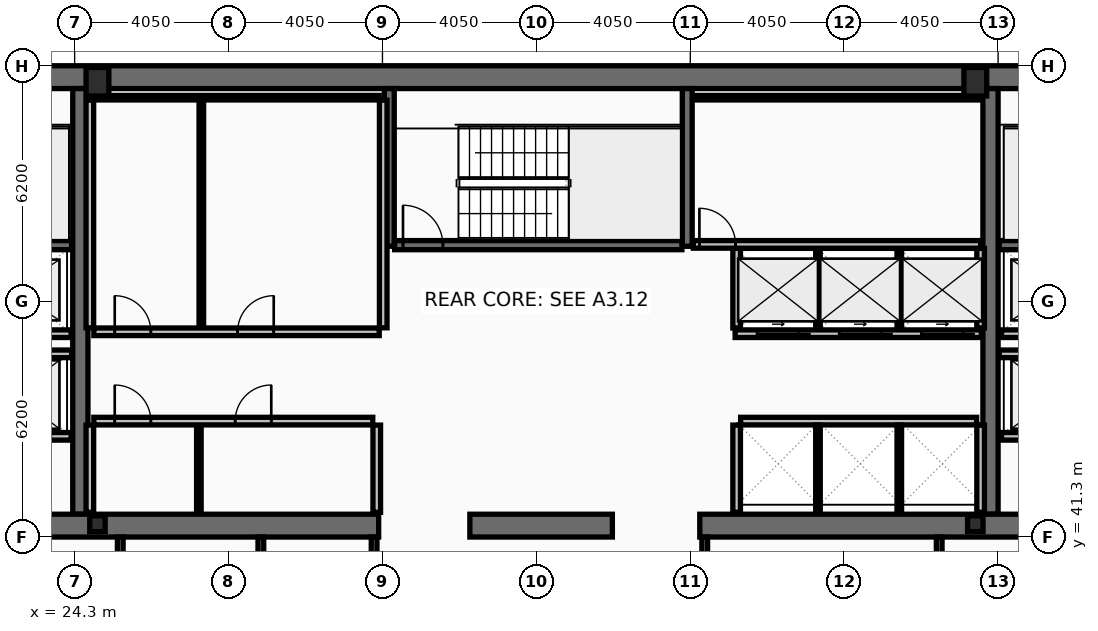
"""IFC4 building model, lengths in metres.
Left out: names, types, materials, properties, quantities, classifications, styles, units other than length and angle.
Written with IfcOpenShell. Run it as: python <this file> out.ifc"""

import sys

from ifc_helpers import new_model, si_unit, direction, frame, frame_2d, origin, origin_2d, place, context, subcontext, project, spatial, rectangle, hollow_rectangle, i_section, extrude, element, fill, save


model = new_model("IFC4")
c1 = context("Model", 3, precision=1e-05, world=origin(), true_north=direction((0.0, 1.0)))
c2 = subcontext(c1, "Body", "Model", "MODEL_VIEW")
j1 = project(units=[si_unit("LENGTHUNIT", "METRE"), si_unit("PLANEANGLEUNIT", "RADIAN")], contexts=[c1])
p1 = place(None, origin())
s1 = spatial("IfcSite", under=j1, at=p1, CompositionType="ELEMENT")
p2 = place(p1, origin())
s2 = spatial("IfcBuilding", under=s1, at=p2, CompositionType="ELEMENT")
p3 = place(p2, frame((0.0, 0.0, 217.4)))
s3 = spatial("IfcBuildingStorey", under=s2, at=p3, CompositionType="ELEMENT", Elevation=217.4)
p4 = place(p3, frame((16.2, 53.4, 0.0), z_axis=(0.0, 0.0, 1.0), x_axis=(1.0, 0.0, 0.0)))
e1 = element("IfcWall", 1, at=p4, inside=s3, PredefinedType="SHEAR", context=c2, shape_type="SweptSolid", body=[
    extrude(rectangle(XDim=40.5, YDim=0.6, at=frame_2d((20.25, 0.0))), origin(), (0.0, 0.0, 1.0), 3.44),
])
for number, where, z_axis, x_axis in (
    (2, (24.45, 41.9, 0.0), (0.0, 0.0, 1.0), (0.0, 1.0, 0.0)),
    (3, (48.4, 41.9, 0.0), (0.0, 0.0, 1.0), (0.0, 1.0, 0.0)),
):
    element("IfcWall", number, at=place(p3, frame(where, z_axis=z_axis, x_axis=x_axis)), inside=s3, PredefinedType="SHEAR", context=c2, shape_type="SweptSolid", body=[
        extrude(rectangle(XDim=11.2, YDim=0.4, at=frame_2d((5.6, 0.0))), origin(), (0.0, 0.0, 1.0), 3.44),
    ])
p5 = place(p3, frame((32.3, 41.6, 0.0), z_axis=(0.0, 0.0, 1.0), x_axis=(-1.0, 0.0, 0.0)))
e4 = element("IfcWall", 4, at=p5, inside=s3, PredefinedType="SHEAR", context=c2, shape_type="SweptSolid", body=[
    extrude(rectangle(XDim=11.45, YDim=0.6, at=frame_2d((5.725, 0.0))), origin(), (0.0, 0.0, 1.0), 3.44),
])
p6 = place(p3, frame((38.45, 41.6, 0.0), z_axis=(0.0, 0.0, 1.0), x_axis=(-1.0, 0.0, 0.0)))
e5 = element("IfcWall", 5, at=p6, inside=s3, PredefinedType="SHEAR", context=c2, shape_type="SweptSolid", body=[
    extrude(rectangle(XDim=3.75, YDim=0.6, at=frame_2d((1.875, 0.0))), origin(), (0.0, 0.0, 1.0), 3.44),
])
p7 = place(p3, frame((52.05, 41.6, 0.0), z_axis=(0.0, 0.0, 1.0), x_axis=(-1.0, 0.0, 0.0)))
e6 = element("IfcWall", 6, at=p7, inside=s3, PredefinedType="SHEAR", context=c2, shape_type="SweptSolid", body=[
    extrude(rectangle(XDim=11.3, YDim=0.6, at=frame_2d((5.65, 0.0))), origin(), (0.0, 0.0, 1.0), 3.44),
])
for number, where, z_axis, x_axis in (
    (7, (32.58, 48.95, 0.0), (0.0, 0.0, 1.0), (0.0, 1.0, 0.0)),
    (8, (40.42, 48.95, 0.0), (0.0, 0.0, 1.0), (0.0, 1.0, 0.0)),
):
    element("IfcWall", number, at=place(p3, frame(where, z_axis=z_axis, x_axis=x_axis)), inside=s3, PredefinedType="SHEAR", context=c2, shape_type="SweptSolid", body=[
        extrude(rectangle(XDim=4.15, YDim=0.26, at=frame_2d((2.075, 0.0))), origin(), (0.0, 0.0, 1.0), 3.44),
    ])
p8 = place(p3, frame((16.8, 48.98, 0.0), z_axis=(0.0, 0.0, 1.0), x_axis=(1.0, 0.0, 0.0)))
e9 = element("IfcWall", 9, at=p8, inside=s3, PredefinedType="SHEAR", context=c2, shape_type="SweptSolid", body=[
    extrude(rectangle(XDim=7.42, YDim=0.24, at=frame_2d((3.71, 0.0))), origin(), (0.0, 0.0, 1.0), 3.44),
])
p9 = place(p8, frame((0.22, 0.0, 0.0)))
e10 = element("IfcOpeningElement", 10, at=p9, cuts=e9, PredefinedType="OPENING", context=c2, shape_type="SweptSolid", body=[
    extrude(rectangle(XDim=1.05, YDim=2.15, at=frame_2d((0.525, 1.075))), frame((0.0, 0.13, 0.0), z_axis=(0.0, -1.0, 0.0), x_axis=(1.0, 0.0, 0.0)), (0.0, 0.0, 1.0), 0.26),
])
p10 = place(p3, frame((48.63, 48.98, 0.0), z_axis=(0.0, 0.0, 1.0), x_axis=(1.0, 0.0, 0.0)))
e11 = element("IfcWall", 11, at=p10, inside=s3, PredefinedType="SHEAR", context=c2, shape_type="SweptSolid", body=[
    extrude(rectangle(XDim=7.47, YDim=0.24, at=frame_2d((3.735, 0.0))), origin(), (0.0, 0.0, 1.0), 3.44),
])
p11 = place(p10, frame((6.2, 0.0, 0.0)))
e12 = element("IfcOpeningElement", 12, at=p11, cuts=e11, PredefinedType="OPENING", context=c2, shape_type="SweptSolid", body=[
    extrude(rectangle(XDim=1.05, YDim=2.15, at=frame_2d((0.525, 1.075))), frame((0.0, 0.13, 0.0), z_axis=(0.0, -1.0, 0.0), x_axis=(1.0, 0.0, 0.0)), (0.0, 0.0, 1.0), 0.26),
])
p12 = place(p3, frame((32.72, 48.98, 0.0), z_axis=(0.0, 0.0, 1.0), x_axis=(1.0, 0.0, 0.0)))
e13 = element("IfcWall", 13, at=p12, inside=s3, PredefinedType="SHEAR", context=c2, shape_type="SweptSolid", body=[
    extrude(rectangle(XDim=7.56, YDim=0.24, at=frame_2d((3.78, 0.0))), origin(), (0.0, 0.0, 1.0), 3.44),
])
p13 = place(p12, frame((0.22, 0.0, 0.0)))
e14 = element("IfcOpeningElement", 14, at=p13, cuts=e13, PredefinedType="OPENING", context=c2, shape_type="SweptSolid", body=[
    extrude(rectangle(XDim=1.05, YDim=2.15, at=frame_2d((0.525, 1.075))), frame((0.0, 0.13, 0.0), z_axis=(0.0, -1.0, 0.0), x_axis=(1.0, 0.0, 0.0)), (0.0, 0.0, 1.0), 0.26),
])
for number, where, z_axis, x_axis in (
    (15, (24.9, 53.28, 0.0), (0.0, 0.0, 1.0), (1.0, 0.0, 0.0)),
    (16, (48.0, 53.28, 0.0), (0.0, 0.0, 1.0), (1.0, 0.0, 0.0)),
):
    element("IfcColumn", number, at=place(p3, frame(where, z_axis=z_axis, x_axis=x_axis)), inside=s3, PredefinedType="COLUMN", context=c2, shape_type="SweptSolid", body=[
        extrude(hollow_rectangle(XDim=0.6, YDim=0.75, WallThickness=0.045, at=origin_2d()), origin(), (0.0, 0.0, 1.0), 3.6),
    ])
for number, where, z_axis, x_axis in (
    (17, (24.9, 41.65, 0.0), (0.0, 0.0, 1.0), (1.0, 0.0, 0.0)),
    (18, (48.0, 41.65, 0.0), (0.0, 0.0, 1.0), (1.0, 0.0, 0.0)),
):
    element("IfcColumn", number, at=place(p3, frame(where, z_axis=z_axis, x_axis=x_axis)), inside=s3, PredefinedType="COLUMN", context=c2, shape_type="SweptSolid", body=[
        extrude(i_section(OverallWidth=0.406, OverallDepth=0.416, WebThickness=0.03, FlangeThickness=0.048, at=origin_2d()), origin(), (0.0, 0.0, 1.0), 3.6),
    ])
p14 = place(p3, frame((51.61, 43.95, 0.0), z_axis=(0.0, 0.0, 1.0), x_axis=(-1.0, 0.0, 0.0)))
e19 = element("IfcWall", 19, at=p14, inside=s3, PredefinedType="PARTITIONING", context=c2, shape_type="SweptSolid", body=[
    extrude(rectangle(XDim=2.92, YDim=0.2, at=frame_2d((1.46, 0.0))), origin(), (0.0, 0.0, 1.0), 3.44),
])
p15 = place(p14, frame((0.81, 0.0, 0.0)))
e20 = element("IfcOpeningElement", 20, at=p15, cuts=e19, PredefinedType="OPENING", context=c2, shape_type="SweptSolid", body=[
    extrude(rectangle(XDim=1.3, YDim=2.18, at=frame_2d((0.65, 1.09))), frame((0.0, 0.11, 0.0), z_axis=(0.0, -1.0, 0.0), x_axis=(1.0, 0.0, 0.0)), (0.0, 0.0, 1.0), 0.22),
])
p16 = place(p3, frame((24.21, 43.95, 0.0), z_axis=(0.0, 0.0, 1.0), x_axis=(-1.0, 0.0, 0.0)))
e21 = element("IfcWall", 21, at=p16, inside=s3, PredefinedType="PARTITIONING", context=c2, shape_type="SweptSolid", body=[
    extrude(rectangle(XDim=2.97, YDim=0.2, at=frame_2d((1.485, 0.0))), origin(), (0.0, 0.0, 1.0), 3.44),
])
p17 = place(p16, frame((0.86, 0.0, 0.0)))
e22 = element("IfcOpeningElement", 22, at=p17, cuts=e21, PredefinedType="OPENING", context=c2, shape_type="SweptSolid", body=[
    extrude(rectangle(XDim=1.3, YDim=2.18, at=frame_2d((0.65, 1.09))), frame((0.0, 0.11, 0.0), z_axis=(0.0, -1.0, 0.0), x_axis=(1.0, 0.0, 0.0)), (0.0, 0.0, 1.0), 0.22),
])
p18 = place(p3, frame((51.61, 46.65, 0.0), z_axis=(0.0, 0.0, 1.0), x_axis=(-1.0, 0.0, 0.0)))
e23 = element("IfcWall", 23, at=p18, inside=s3, PredefinedType="PARTITIONING", context=c2, shape_type="SweptSolid", body=[
    extrude(rectangle(XDim=2.92, YDim=0.2, at=frame_2d((1.46, 0.0))), origin(), (0.0, 0.0, 1.0), 3.44),
])
p19 = place(p18, frame((0.86, 0.0, 0.0)))
e24 = element("IfcOpeningElement", 24, at=p19, cuts=e23, PredefinedType="OPENING", context=c2, shape_type="SweptSolid", body=[
    extrude(rectangle(XDim=1.2, YDim=2.18, at=frame_2d((0.6, 1.09))), frame((0.0, 0.11, 0.0), z_axis=(0.0, -1.0, 0.0), x_axis=(1.0, 0.0, 0.0)), (0.0, 0.0, 1.0), 0.22),
])
p20 = place(p3, frame((24.21, 46.65, 0.0), z_axis=(0.0, 0.0, 1.0), x_axis=(-1.0, 0.0, 0.0)))
e25 = element("IfcWall", 25, at=p20, inside=s3, PredefinedType="PARTITIONING", context=c2, shape_type="SweptSolid", body=[
    extrude(rectangle(XDim=2.97, YDim=0.2, at=frame_2d((1.485, 0.0))), origin(), (0.0, 0.0, 1.0), 3.44),
])
p21 = place(p20, frame((0.91, 0.0, 0.0)))
e26 = element("IfcOpeningElement", 26, at=p21, cuts=e25, PredefinedType="OPENING", context=c2, shape_type="SweptSolid", body=[
    extrude(rectangle(XDim=1.2, YDim=2.18, at=frame_2d((0.6, 1.09))), frame((0.0, 0.11, 0.0), z_axis=(0.0, -1.0, 0.0), x_axis=(1.0, 0.0, 0.0)), (0.0, 0.0, 1.0), 0.22),
])
p22 = place(p3, frame((48.16, 46.65, 0.0), z_axis=(0.0, 0.0, 1.0), x_axis=(-1.0, 0.0, 0.0)))
e27 = element("IfcWall", 27, at=p22, inside=s3, PredefinedType="PARTITIONING", context=c2, shape_type="SweptSolid", body=[
    extrude(rectangle(XDim=6.48, YDim=0.2, at=frame_2d((3.24, 0.0))), origin(), (0.0, 0.0, 1.0), 3.44),
])
p23 = place(p22, frame((4.8, 0.0, 0.0)))
e28 = element("IfcOpeningElement", 28, at=p23, cuts=e27, PredefinedType="OPENING", context=c2, shape_type="SweptSolid", body=[
    extrude(rectangle(XDim=1.1, YDim=2.18, at=frame_2d((0.55, 1.09))), frame((0.0, 0.11, 0.0), z_axis=(0.0, -1.0, 0.0), x_axis=(1.0, 0.0, 0.0)), (0.0, 0.0, 1.0), 0.22),
])
p24 = place(p22, frame((2.64, 0.0, 0.0)))
e29 = element("IfcOpeningElement", 29, at=p24, cuts=e27, PredefinedType="OPENING", context=c2, shape_type="SweptSolid", body=[
    extrude(rectangle(XDim=1.1, YDim=2.18, at=frame_2d((0.55, 1.09))), frame((0.0, 0.11, 0.0), z_axis=(0.0, -1.0, 0.0), x_axis=(1.0, 0.0, 0.0)), (0.0, 0.0, 1.0), 0.22),
])
p25 = place(p22, frame((0.48, 0.0, 0.0)))
e30 = element("IfcOpeningElement", 30, at=p25, cuts=e27, PredefinedType="OPENING", context=c2, shape_type="SweptSolid", body=[
    extrude(rectangle(XDim=1.1, YDim=2.18, at=frame_2d((0.55, 1.09))), frame((0.0, 0.11, 0.0), z_axis=(0.0, -1.0, 0.0), x_axis=(1.0, 0.0, 0.0)), (0.0, 0.0, 1.0), 0.22),
])
p26 = place(p3, frame((21.2, 46.12, 0.0), z_axis=(0.0, 0.0, 1.0), x_axis=(1.0, 0.0, 0.0)))
e31 = element("IfcWall", 31, at=p26, inside=s3, PredefinedType="PARTITIONING", context=c2, shape_type="SweptSolid", body=[
    extrude(rectangle(XDim=3.02, YDim=0.2, at=frame_2d((1.51, 0.0))), origin(), (0.0, 0.0, 1.0), 3.44),
])
p27 = place(p3, frame((48.63, 46.12, 0.0), z_axis=(0.0, 0.0, 1.0), x_axis=(1.0, 0.0, 0.0)))
e32 = element("IfcWall", 32, at=p27, inside=s3, PredefinedType="PARTITIONING", context=c2, shape_type="SweptSolid", body=[
    extrude(rectangle(XDim=3.07, YDim=0.2, at=frame_2d((1.535, 0.0))), origin(), (0.0, 0.0, 1.0), 3.44),
])
for number, where, z_axis, x_axis in (
    (33, (24.7, 46.805, 0.0), (0.0, 0.0, 1.0), (0.0, 1.0, 0.0)),
    (34, (32.42, 46.805, 0.0), (0.0, 0.0, 1.0), (0.0, 1.0, 0.0)),
):
    element("IfcWall", number, at=place(p3, frame(where, z_axis=z_axis, x_axis=x_axis)), inside=s3, PredefinedType="PARTITIONING", context=c2, shape_type="SweptSolid", body=[
        extrude(rectangle(XDim=5.99, YDim=0.2, at=frame_2d((2.995, 0.0))), origin(), (0.0, 0.0, 1.0), 3.44),
    ])
p28 = place(p3, frame((24.805, 52.86, 0.0), z_axis=(0.0, 0.0, 1.0), x_axis=(1.0, 0.0, 0.0)))
e35 = element("IfcWall", 35, at=p28, inside=s3, PredefinedType="PARTITIONING", context=c2, shape_type="SweptSolid", body=[
    extrude(rectangle(XDim=7.51, YDim=0.12, at=frame_2d((3.755, 0.0))), origin(), (0.0, 0.0, 1.0), 3.44),
])
p29 = place(p3, frame((27.634, 46.805, 0.0), z_axis=(0.0, 0.0, 1.0), x_axis=(0.0, 1.0, 0.0)))
e36 = element("IfcWall", 36, at=p29, inside=s3, PredefinedType="PARTITIONING", context=c2, shape_type="SweptSolid", body=[
    extrude(rectangle(XDim=5.99, YDim=0.12, at=frame_2d((2.995, 0.0))), origin(), (0.0, 0.0, 1.0), 3.44),
])
p30 = place(p3, frame((24.805, 46.7, 0.0), z_axis=(0.0, 0.0, 1.0), x_axis=(1.0, 0.0, 0.0)))
e37 = element("IfcWall", 37, at=p30, inside=s3, PredefinedType="PARTITIONING", context=c2, shape_type="SweptSolid", body=[
    extrude(rectangle(XDim=7.51, YDim=0.2, at=frame_2d((3.755, 0.0))), origin(), (0.0, 0.0, 1.0), 3.44),
])
p31 = place(p30, frame((0.55, 0.0, 0.0)))
e38 = element("IfcOpeningElement", 38, at=p31, cuts=e37, PredefinedType="OPENING", context=c2, shape_type="SweptSolid", body=[
    extrude(rectangle(XDim=0.95, YDim=2.1, at=frame_2d((0.475, 1.05))), frame((0.0, 0.11, 0.0), z_axis=(0.0, -1.0, 0.0), x_axis=(1.0, 0.0, 0.0)), (0.0, 0.0, 1.0), 0.22),
])
p32 = place(p30, frame((3.784, 0.0, 0.0)))
e39 = element("IfcOpeningElement", 39, at=p32, cuts=e37, PredefinedType="OPENING", context=c2, shape_type="SweptSolid", body=[
    extrude(rectangle(XDim=0.95, YDim=2.1, at=frame_2d((0.475, 1.05))), frame((0.0, 0.11, 0.0), z_axis=(0.0, -1.0, 0.0), x_axis=(1.0, 0.0, 0.0)), (0.0, 0.0, 1.0), 0.22),
])
for number, where, z_axis, x_axis in (
    (40, (24.7, 41.95, 0.0), (0.0, 0.0, 1.0), (0.0, 1.0, 0.0)),
    (41, (32.25, 41.95, 0.0), (0.0, 0.0, 1.0), (0.0, 1.0, 0.0)),
):
    element("IfcWall", number, at=place(p3, frame(where, z_axis=z_axis, x_axis=x_axis)), inside=s3, PredefinedType="PARTITIONING", context=c2, shape_type="SweptSolid", body=[
        extrude(rectangle(XDim=2.295, YDim=0.2, at=frame_2d((1.147, 0.0))), origin(), (0.0, 0.0, 1.0), 3.44),
    ])
p33 = place(p3, frame((27.569, 41.95, 0.0), z_axis=(0.0, 0.0, 1.0), x_axis=(0.0, 1.0, 0.0)))
e42 = element("IfcWall", 42, at=p33, inside=s3, PredefinedType="PARTITIONING", context=c2, shape_type="SweptSolid", body=[
    extrude(rectangle(XDim=2.295, YDim=0.12, at=frame_2d((1.147, 0.0))), origin(), (0.0, 0.0, 1.0), 3.44),
])
p34 = place(p3, frame((24.805, 44.35, 0.0), z_axis=(0.0, 0.0, 1.0), x_axis=(1.0, 0.0, 0.0)))
e43 = element("IfcWall", 43, at=p34, inside=s3, PredefinedType="PARTITIONING", context=c2, shape_type="SweptSolid", body=[
    extrude(rectangle(XDim=7.34, YDim=0.2, at=frame_2d((3.67, 0.0))), origin(), (0.0, 0.0, 1.0), 3.44),
])
p35 = place(p34, frame((0.55, 0.0, 0.0)))
e44 = element("IfcOpeningElement", 44, at=p35, cuts=e43, PredefinedType="OPENING", context=c2, shape_type="SweptSolid", body=[
    extrude(rectangle(XDim=0.95, YDim=2.1, at=frame_2d((0.475, 1.05))), frame((0.0, 0.11, 0.0), z_axis=(0.0, -1.0, 0.0), x_axis=(1.0, 0.0, 0.0)), (0.0, 0.0, 1.0), 0.22),
])
p36 = place(p34, frame((3.719, 0.0, 0.0)))
e45 = element("IfcOpeningElement", 45, at=p36, cuts=e43, PredefinedType="OPENING", context=c2, shape_type="SweptSolid", body=[
    extrude(rectangle(XDim=0.95, YDim=2.1, at=frame_2d((0.475, 1.05))), frame((0.0, 0.11, 0.0), z_axis=(0.0, -1.0, 0.0), x_axis=(1.0, 0.0, 0.0)), (0.0, 0.0, 1.0), 0.22),
])
for number, where, z_axis, x_axis in (
    (46, (41.72, 46.8, 0.0), (0.0, 0.0, 1.0), (0.0, 1.0, 0.0)),
    (47, (48.14, 46.8, 0.0), (0.0, 0.0, 1.0), (0.0, 1.0, 0.0)),
):
    element("IfcWall", number, at=place(p3, frame(where, z_axis=z_axis, x_axis=x_axis)), inside=s3, PredefinedType="PARTITIONING", context=c2, shape_type="SweptSolid", body=[
        extrude(rectangle(XDim=2.095, YDim=0.2, at=frame_2d((1.047, 0.0))), origin(), (0.0, 0.0, 1.0), 3.44),
    ])
for number, where, z_axis, x_axis in (
    (48, (43.86, 46.8, 0.0), (0.0, 0.0, 1.0), (0.0, 1.0, 0.0)),
    (49, (46.0, 46.8, 0.0), (0.0, 0.0, 1.0), (0.0, 1.0, 0.0)),
):
    element("IfcWall", number, at=place(p3, frame(where, z_axis=z_axis, x_axis=x_axis)), inside=s3, PredefinedType="PARTITIONING", context=c2, shape_type="SweptSolid", body=[
        extrude(rectangle(XDim=2.095, YDim=0.12, at=frame_2d((1.047, 0.0))), origin(), (0.0, 0.0, 1.0), 3.44),
    ])
p37 = place(p3, frame((41.825, 44.35, 0.0), z_axis=(0.0, 0.0, 1.0), x_axis=(1.0, 0.0, 0.0)))
e50 = element("IfcWall", 50, at=p37, inside=s3, PredefinedType="PARTITIONING", context=c2, shape_type="SweptSolid", body=[
    extrude(rectangle(XDim=6.21, YDim=0.2, at=frame_2d((3.105, 0.0))), origin(), (0.0, 0.0, 1.0), 3.44),
])
for number, where, z_axis, x_axis in (
    (51, (41.72, 41.95, 0.0), (0.0, 0.0, 1.0), (0.0, 1.0, 0.0)),
    (52, (48.14, 41.95, 0.0), (0.0, 0.0, 1.0), (0.0, 1.0, 0.0)),
):
    element("IfcWall", number, at=place(p3, frame(where, z_axis=z_axis, x_axis=x_axis)), inside=s3, PredefinedType="PARTITIONING", context=c2, shape_type="SweptSolid", body=[
        extrude(rectangle(XDim=2.295, YDim=0.2, at=frame_2d((1.147, 0.0))), origin(), (0.0, 0.0, 1.0), 3.44),
    ])
for number, where, z_axis, x_axis in (
    (53, (43.86, 41.95, 0.0), (0.0, 0.0, 1.0), (0.0, 1.0, 0.0)),
    (54, (46.0, 41.95, 0.0), (0.0, 0.0, 1.0), (0.0, 1.0, 0.0)),
):
    element("IfcWall", number, at=place(p3, frame(where, z_axis=z_axis, x_axis=x_axis)), inside=s3, PredefinedType="PARTITIONING", context=c2, shape_type="SweptSolid", body=[
        extrude(rectangle(XDim=2.295, YDim=0.12, at=frame_2d((1.147, 0.0))), origin(), (0.0, 0.0, 1.0), 3.44),
    ])
p38 = place(p3, frame((40.58, 52.86, 0.0), z_axis=(0.0, 0.0, 1.0), x_axis=(1.0, 0.0, 0.0)))
e55 = element("IfcWall", 55, at=p38, inside=s3, PredefinedType="PARTITIONING", context=c2, shape_type="SweptSolid", body=[
    extrude(rectangle(XDim=7.56, YDim=0.12, at=frame_2d((3.78, 0.0))), origin(), (0.0, 0.0, 1.0), 3.44),
])
p39 = place(p3, frame((40.58, 49.0, 0.0), z_axis=(0.0, 0.0, 1.0), x_axis=(1.0, 0.0, 0.0)))
e56 = element("IfcWall", 56, at=p39, inside=s3, PredefinedType="PARTITIONING", context=c2, shape_type="SweptSolid", body=[
    extrude(rectangle(XDim=7.56, YDim=0.2, at=frame_2d((3.78, 0.0))), origin(), (0.0, 0.0, 1.0), 3.44),
])
p40 = place(p39, frame((0.16, 0.0, 0.0)))
e57 = element("IfcOpeningElement", 57, at=p40, cuts=e56, PredefinedType="OPENING", context=c2, shape_type="SweptSolid", body=[
    extrude(rectangle(XDim=0.95, YDim=2.1, at=frame_2d((0.475, 1.05))), frame((0.0, 0.11, 0.0), z_axis=(0.0, -1.0, 0.0), x_axis=(1.0, 0.0, 0.0)), (0.0, 0.0, 1.0), 0.22),
])
for number, where, z_axis, x_axis in (
    (58, (25.5, 38.28, 0.0), (0.0, 0.0, 1.0), (0.0, 1.0, 0.0)),
    (59, (29.2, 38.28, 0.0), (0.0, 0.0, 1.0), (0.0, 1.0, 0.0)),
    (60, (32.18, 38.28, 0.0), (0.0, 0.0, 1.0), (0.0, 1.0, 0.0)),
    (61, (40.88, 38.28, 0.0), (0.0, 0.0, 1.0), (0.0, 1.0, 0.0)),
    (62, (47.05, 38.28, 0.0), (0.0, 0.0, 1.0), (0.0, 1.0, 0.0)),
):
    element("IfcWall", number, at=place(p3, frame(where, z_axis=z_axis, x_axis=x_axis)), inside=s3, PredefinedType="PARTITIONING", context=c2, shape_type="SweptSolid", body=[
        extrude(rectangle(XDim=3.02, YDim=0.15, at=frame_2d((1.51, 0.0))), origin(), (0.0, 0.0, 1.0), 3.44),
    ])
p41 = place(p13, origin())
e63 = element("IfcDoor", 63, at=p41, inside=s3, OperationType="SINGLE_SWING_LEFT", PredefinedType="DOOR", context=c2, shape_type="SweptSolid", body=[
    extrude(rectangle(XDim=1.05, YDim=2.15, at=frame_2d((0.525, 1.075))), frame((0.0, 0.025, 0.0), z_axis=(0.0, -1.0, 0.0), x_axis=(1.0, 0.0, 0.0)), (0.0, 0.0, 1.0), 0.05),
])
fill(e14, e63)
p42 = place(p23, origin())
e64 = element("IfcDoor", 64, at=p42, inside=s3, OperationType="SLIDING_TO_LEFT", PredefinedType="DOOR", context=c2, shape_type="SweptSolid", body=[
    extrude(rectangle(XDim=1.1, YDim=2.18, at=frame_2d((0.55, 1.09))), frame((0.0, 0.025, 0.0), z_axis=(0.0, -1.0, 0.0), x_axis=(1.0, 0.0, 0.0)), (0.0, 0.0, 1.0), 0.05),
])
fill(e28, e64)
p43 = place(p24, origin())
e65 = element("IfcDoor", 65, at=p43, inside=s3, OperationType="SLIDING_TO_LEFT", PredefinedType="DOOR", context=c2, shape_type="SweptSolid", body=[
    extrude(rectangle(XDim=1.1, YDim=2.18, at=frame_2d((0.55, 1.09))), frame((0.0, 0.025, 0.0), z_axis=(0.0, -1.0, 0.0), x_axis=(1.0, 0.0, 0.0)), (0.0, 0.0, 1.0), 0.05),
])
fill(e29, e65)
p44 = place(p25, origin())
e66 = element("IfcDoor", 66, at=p44, inside=s3, OperationType="SLIDING_TO_LEFT", PredefinedType="DOOR", context=c2, shape_type="SweptSolid", body=[
    extrude(rectangle(XDim=1.1, YDim=2.18, at=frame_2d((0.55, 1.09))), frame((0.0, 0.025, 0.0), z_axis=(0.0, -1.0, 0.0), x_axis=(1.0, 0.0, 0.0)), (0.0, 0.0, 1.0), 0.05),
])
fill(e30, e66)
p45 = place(p31, origin())
e67 = element("IfcDoor", 67, at=p45, inside=s3, OperationType="SINGLE_SWING_LEFT", PredefinedType="DOOR", context=c2, shape_type="SweptSolid", body=[
    extrude(rectangle(XDim=0.95, YDim=2.1, at=frame_2d((0.475, 1.05))), frame((0.0, 0.025, 0.0), z_axis=(0.0, -1.0, 0.0), x_axis=(1.0, 0.0, 0.0)), (0.0, 0.0, 1.0), 0.05),
])
fill(e38, e67)
p46 = place(p32, origin())
e68 = element("IfcDoor", 68, at=p46, inside=s3, OperationType="SINGLE_SWING_RIGHT", PredefinedType="DOOR", context=c2, shape_type="SweptSolid", body=[
    extrude(rectangle(XDim=0.95, YDim=2.1, at=frame_2d((0.475, 1.05))), frame((0.0, 0.025, 0.0), z_axis=(0.0, -1.0, 0.0), x_axis=(1.0, 0.0, 0.0)), (0.0, 0.0, 1.0), 0.05),
])
fill(e39, e68)
p47 = place(p35, origin())
e69 = element("IfcDoor", 69, at=p47, inside=s3, OperationType="SINGLE_SWING_LEFT", PredefinedType="DOOR", context=c2, shape_type="SweptSolid", body=[
    extrude(rectangle(XDim=0.95, YDim=2.1, at=frame_2d((0.475, 1.05))), frame((0.0, 0.025, 0.0), z_axis=(0.0, -1.0, 0.0), x_axis=(1.0, 0.0, 0.0)), (0.0, 0.0, 1.0), 0.05),
])
fill(e44, e69)
p48 = place(p36, origin())
e70 = element("IfcDoor", 70, at=p48, inside=s3, OperationType="SINGLE_SWING_RIGHT", PredefinedType="DOOR", context=c2, shape_type="SweptSolid", body=[
    extrude(rectangle(XDim=0.95, YDim=2.1, at=frame_2d((0.475, 1.05))), frame((0.0, 0.025, 0.0), z_axis=(0.0, -1.0, 0.0), x_axis=(1.0, 0.0, 0.0)), (0.0, 0.0, 1.0), 0.05),
])
fill(e45, e70)
p49 = place(p40, origin())
e71 = element("IfcDoor", 71, at=p49, inside=s3, OperationType="SINGLE_SWING_LEFT", PredefinedType="DOOR", context=c2, shape_type="SweptSolid", body=[
    extrude(rectangle(XDim=0.95, YDim=2.1, at=frame_2d((0.475, 1.05))), frame((0.0, 0.025, 0.0), z_axis=(0.0, -1.0, 0.0), x_axis=(1.0, 0.0, 0.0)), (0.0, 0.0, 1.0), 0.05),
])
fill(e57, e71)
save(model, sys.argv[1])
